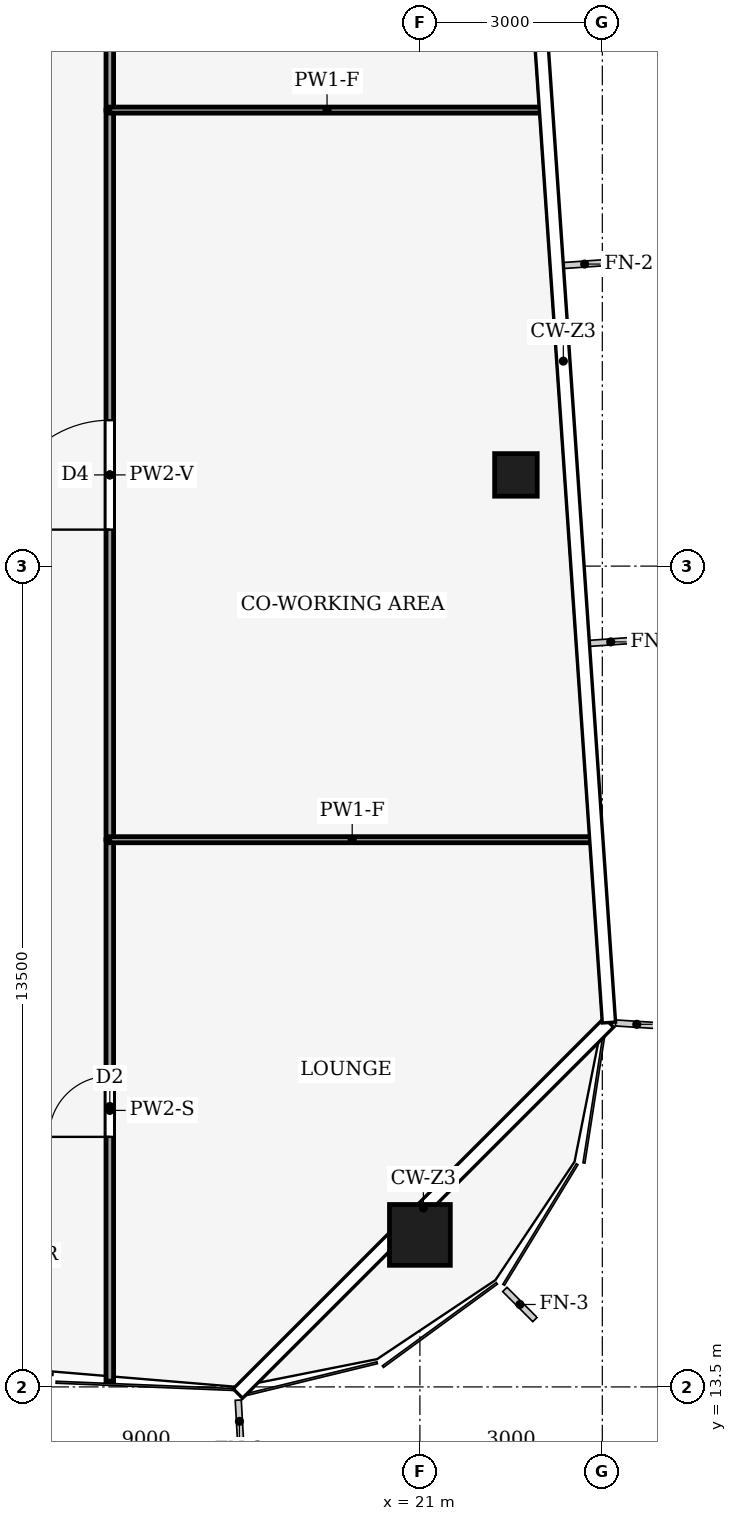
"""IFC4 building model, lengths in metres.
Left out: names, types, materials, properties, quantities, classifications, styles, units other than length and angle.
Written with IfcOpenShell. Run it as: python <this file> out.ifc"""

import sys

from ifc_helpers import new_model, si_unit, direction, frame, frame_2d, origin, origin_2d, place, context, subcontext, project, spatial, rectangle, hollow_rectangle, extrude, element, fill, save


model = new_model("IFC4")
c1 = context("Model", 3, precision=1e-05, world=origin(), true_north=direction((0.0, 1.0)))
c2 = subcontext(c1, "Body", "Model", "MODEL_VIEW")
j1 = project(units=[si_unit("LENGTHUNIT", "METRE"), si_unit("PLANEANGLEUNIT", "RADIAN")], contexts=[c1])
p1 = place(None, origin())
s1 = spatial("IfcSite", under=j1, at=p1, CompositionType="ELEMENT")
p2 = place(p1, origin())
s2 = spatial("IfcBuilding", under=s1, at=p2, CompositionType="ELEMENT")
p3 = place(p2, frame((0.0, 0.0, 218.0)))
s3 = spatial("IfcBuildingStorey", under=s2, at=p3, CompositionType="ELEMENT", Elevation=218.0)
p4 = place(p3, frame((21.0, 16.0, 0.0), z_axis=(0.0, 0.0, 1.0), x_axis=(1.0, 0.0, 0.0)))
e1 = element("IfcColumn", 1, at=p4, inside=s3, PredefinedType="COLUMN", context=c2, shape_type="SweptSolid", body=[
    extrude(hollow_rectangle(XDim=1.0, YDim=1.0, WallThickness=0.06, at=origin_2d()), origin(), (0.0, 0.0, 1.0), 4.0),
])
p5 = place(p3, frame((22.579, 28.5, 0.0), z_axis=(0.0, 0.0, 1.0), x_axis=(1.0, 0.0, 0.0)))
e2 = element("IfcColumn", 2, at=p5, inside=s3, PredefinedType="COLUMN", context=c2, shape_type="SweptSolid", body=[
    extrude(hollow_rectangle(XDim=0.7, YDim=0.7, WallThickness=0.03, at=origin_2d()), origin(), (0.0, 0.0, 1.0), 4.0),
])
p6 = place(p3, frame((15.9, 13.595, 0.0), z_axis=(0.0, 0.0, 1.0), x_axis=(0.0, 1.0, 0.0)))
e3 = element("IfcWall", 3, at=p6, inside=s3, PredefinedType="PARTITIONING", context=c2, shape_type="SweptSolid", body=[
    extrude(rectangle(XDim=8.905, YDim=0.125, at=frame_2d((4.453, 0.0))), origin(), (0.0, 0.0, 1.0), 3.04),
])
p7 = place(p6, frame((4.018, 0.0, 0.0)))
e4 = element("IfcOpeningElement", 4, at=p7, cuts=e3, PredefinedType="OPENING", context=c2, shape_type="SweptSolid", body=[
    extrude(rectangle(XDim=1.0, YDim=2.1, at=frame_2d((0.5, 1.05))), frame((0.0, 0.073, 0.0), z_axis=(0.0, -1.0, 0.0), x_axis=(1.0, 0.0, 0.0)), (0.0, 0.0, 1.0), 0.145),
])
p8 = place(p3, frame((15.9, 22.5, 0.0), z_axis=(0.0, 0.0, 1.0), x_axis=(0.0, 1.0, 0.0)))
e5 = element("IfcWall", 5, at=p8, inside=s3, PredefinedType="PARTITIONING", context=c2, shape_type="SweptSolid", body=[
    extrude(rectangle(XDim=12.0, YDim=0.125, at=frame_2d((6.0, 0.0))), origin(), (0.0, 0.0, 1.0), 3.44),
])
p9 = place(p8, frame((5.1, 0.0, 0.0)))
e6 = element("IfcOpeningElement", 6, at=p9, cuts=e5, PredefinedType="OPENING", context=c2, shape_type="SweptSolid", body=[
    extrude(rectangle(XDim=1.8, YDim=2.1, at=frame_2d((0.9, 1.05))), frame((0.0, 0.073, 0.0), z_axis=(0.0, -1.0, 0.0), x_axis=(1.0, 0.0, 0.0)), (0.0, 0.0, 1.0), 0.145),
])
p10 = place(p3, frame((15.9, 40.904, 0.0), z_axis=(0.0, 0.0, 1.0), x_axis=(0.0, -1.0, 0.0)))
e7 = element("IfcWall", 7, at=p10, inside=s3, PredefinedType="PARTITIONING", context=c2, shape_type="SweptSolid", body=[
    extrude(rectangle(XDim=6.404, YDim=0.125, at=frame_2d((3.202, 0.0))), origin(), (0.0, 0.0, 1.0), 3.14),
])
p11 = place(p10, frame((2.702, 0.0, 0.0)))
e8 = element("IfcOpeningElement", 8, at=p11, cuts=e7, PredefinedType="OPENING", context=c2, shape_type="SweptSolid", body=[
    extrude(rectangle(XDim=1.0, YDim=2.1, at=frame_2d((0.5, 1.05))), frame((0.0, 0.073, 0.0), z_axis=(0.0, -1.0, 0.0), x_axis=(1.0, 0.0, 0.0)), (0.0, 0.0, 1.0), 0.145),
])
p12 = place(p3, frame((23.873, 22.5, 0.0), z_axis=(0.0, 0.0, 1.0), x_axis=(-1.0, 0.0, 0.0)))
e9 = element("IfcWall", 9, at=p12, inside=s3, PredefinedType="PARTITIONING", context=c2, shape_type="SweptSolid", body=[
    extrude(rectangle(XDim=7.973, YDim=0.1, at=frame_2d((3.987, 0.0))), origin(), (0.0, 0.0, 1.0), 3.04),
])
p13 = place(p3, frame((23.045, 34.5, 0.0), z_axis=(0.0, 0.0, 1.0), x_axis=(-1.0, 0.0, 0.0)))
e10 = element("IfcWall", 10, at=p13, inside=s3, PredefinedType="PARTITIONING", context=c2, shape_type="SweptSolid", body=[
    extrude(rectangle(XDim=7.146, YDim=0.1, at=frame_2d((3.573, 0.0))), origin(), (0.0, 0.0, 1.0), 3.04),
])
p14 = place(p7, origin())
e11 = element("IfcDoor", 11, at=p14, inside=s3, OperationType="SINGLE_SWING_RIGHT", PredefinedType="DOOR", context=c2, shape_type="SweptSolid", body=[
    extrude(rectangle(XDim=1.0, YDim=2.1, at=frame_2d((0.5, 1.05))), frame((0.0, 0.025, 0.0), z_axis=(0.0, -1.0, 0.0), x_axis=(1.0, 0.0, 0.0)), (0.0, 0.0, 1.0), 0.05),
])
fill(e4, e11)
p15 = place(p9, origin())
e12 = element("IfcDoor", 12, at=p15, inside=s3, OperationType="DOUBLE_DOOR_SINGLE_SWING", PredefinedType="DOOR", context=c2, shape_type="SweptSolid", body=[
    extrude(rectangle(XDim=1.8, YDim=2.1, at=frame_2d((0.9, 1.05))), frame((0.0, 0.025, 0.0), z_axis=(0.0, -1.0, 0.0), x_axis=(1.0, 0.0, 0.0)), (0.0, 0.0, 1.0), 0.05),
])
fill(e6, e12)
save(model, sys.argv[1])
